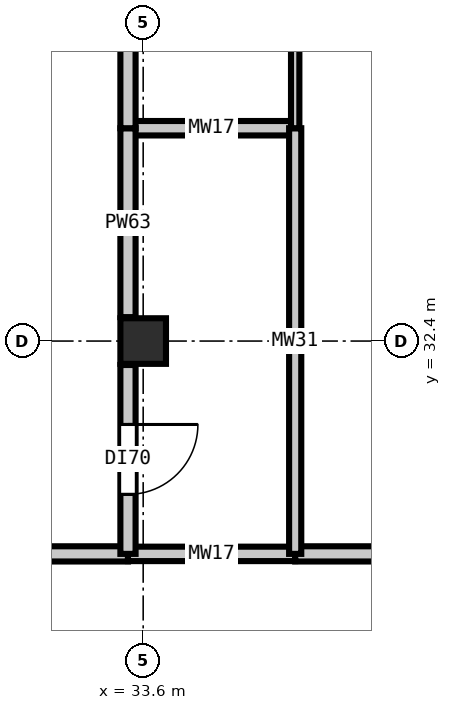
"""IFC4 building model, lengths in metres.
Left out: names, types, materials, properties, quantities, classifications, styles, units other than length and angle.
Written with IfcOpenShell. Run it as: python <this file> out.ifc"""

import sys

from ifc_helpers import new_model, si_unit, direction, frame, frame_2d, origin, origin_2d, place, context, subcontext, project, spatial, rectangle, extrude, element, fill, save


model = new_model("IFC4")
c1 = context("Model", 3, precision=1e-05, world=origin(), true_north=direction((0.0, 1.0)))
c2 = subcontext(c1, "Body", "Model", "MODEL_VIEW")
j1 = project(units=[si_unit("LENGTHUNIT", "METRE"), si_unit("PLANEANGLEUNIT", "RADIAN")], contexts=[c1])
p1 = place(None, origin())
s1 = spatial("IfcSite", under=j1, at=p1, CompositionType="ELEMENT")
p2 = place(p1, origin())
s2 = spatial("IfcBuilding", under=s1, at=p2, CompositionType="ELEMENT")
p3 = place(p2, frame((0.0, 0.0, 5.4)))
s3 = spatial("IfcBuildingStorey", under=s2, at=p3, CompositionType="ELEMENT", Elevation=5.4)
p4 = place(p3, frame((33.6, 32.4, 0.0), z_axis=(0.0, 0.0, 1.0), x_axis=(1.0, 0.0, 0.0)))
e1 = element("IfcColumn", 1, at=p4, inside=s3, PredefinedType="COLUMN", context=c2, shape_type="SweptSolid", body=[
    extrude(rectangle(XDim=0.6, YDim=0.6, at=origin_2d()), origin(), (0.0, 0.0, 1.0), 5.4),
])
p5 = place(p3, frame((28.6, 29.6, 0.0), z_axis=(0.0, 0.0, 1.0), x_axis=(1.0, 0.0, 0.0)))
e2 = element("IfcWall", 2, at=p5, inside=s3, PredefinedType="PARTITIONING", context=c2, shape_type="SweptSolid", body=[
    extrude(rectangle(XDim=4.8, YDim=0.2, at=frame_2d((2.4, 0.0))), origin(), (0.0, 0.0, 1.0), 5.05),
])
p6 = place(p5, frame((1.775, 0.0, 0.0)))
e3 = element("IfcOpeningElement", 3, at=p6, cuts=e2, PredefinedType="OPENING", context=c2, shape_type="SweptSolid", body=[
    extrude(rectangle(XDim=1.25, YDim=2.15, at=frame_2d((0.625, 1.075))), frame((0.0, 0.11, 0.0), z_axis=(0.0, -1.0, 0.0), x_axis=(1.0, 0.0, 0.0)), (0.0, 0.0, 1.0), 0.22),
])
p7 = place(p3, frame((33.4, 29.6, 0.0), z_axis=(0.0, 0.0, 1.0), x_axis=(1.0, 0.0, 0.0)))
e4 = element("IfcWall", 4, at=p7, inside=s3, PredefinedType="PLUMBINGWALL", context=c2, shape_type="SweptSolid", body=[
    extrude(rectangle(XDim=2.2, YDim=0.19, at=frame_2d((1.1, 0.0))), origin(), (0.0, 0.0, 1.0), 5.05),
])
p8 = place(p3, frame((35.6, 29.6, 0.0), z_axis=(0.0, 0.0, 1.0), x_axis=(1.0, 0.0, 0.0)))
e5 = element("IfcWall", 5, at=p8, inside=s3, PredefinedType="PARTITIONING", context=c2, shape_type="SweptSolid", body=[
    extrude(rectangle(XDim=5.6, YDim=0.2, at=frame_2d((2.8, 0.0))), origin(), (0.0, 0.0, 1.0), 5.05),
])
p9 = place(p8, frame((2.15, 0.0, 0.0)))
e6 = element("IfcOpeningElement", 6, at=p9, cuts=e5, PredefinedType="OPENING", context=c2, shape_type="SweptSolid", body=[
    extrude(rectangle(XDim=1.3, YDim=2.2, at=frame_2d((0.65, 1.1))), frame((0.0, 0.11, 0.0), z_axis=(0.0, -1.0, 0.0), x_axis=(1.0, 0.0, 0.0)), (0.0, 0.0, 1.0), 0.22),
])
p10 = place(p3, frame((33.4, 35.2, 0.0), z_axis=(0.0, 0.0, 1.0), x_axis=(1.0, 0.0, 0.0)))
e7 = element("IfcWall", 7, at=p10, inside=s3, PredefinedType="PLUMBINGWALL", context=c2, shape_type="SweptSolid", body=[
    extrude(rectangle(XDim=2.2, YDim=0.19, at=frame_2d((1.1, 0.0))), origin(), (0.0, 0.0, 1.0), 5.05),
])
p11 = place(p3, frame((33.4, 29.6, 0.0), z_axis=(0.0, 0.0, 1.0), x_axis=(0.0, 1.0, 0.0)))
e8 = element("IfcWall", 8, at=p11, inside=s3, PredefinedType="PARTITIONING", context=c2, shape_type="SweptSolid", body=[
    extrude(rectangle(XDim=2.485, YDim=0.2, at=frame_2d((1.242, 0.0))), origin(), (0.0, 0.0, 1.0), 4.735),
])
p12 = place(p11, frame((0.782, 0.0, 0.0)))
e9 = element("IfcOpeningElement", 9, at=p12, cuts=e8, PredefinedType="OPENING", context=c2, shape_type="SweptSolid", body=[
    extrude(rectangle(XDim=0.92, YDim=2.1, at=frame_2d((0.46, 1.05))), frame((0.0, 0.11, 0.0), z_axis=(0.0, -1.0, 0.0), x_axis=(1.0, 0.0, 0.0)), (0.0, 0.0, 1.0), 0.22),
])
p13 = place(p3, frame((33.4, 32.715, 0.0), z_axis=(0.0, 0.0, 1.0), x_axis=(0.0, 1.0, 0.0)))
e10 = element("IfcWall", 10, at=p13, inside=s3, PredefinedType="PARTITIONING", context=c2, shape_type="SweptSolid", body=[
    extrude(rectangle(XDim=2.485, YDim=0.2, at=frame_2d((1.242, 0.0))), origin(), (0.0, 0.0, 1.0), 4.735),
])
p14 = place(p3, frame((33.4, 35.2, 0.0), z_axis=(0.0, 0.0, 1.0), x_axis=(0.0, 1.0, 0.0)))
e11 = element("IfcWall", 11, at=p14, inside=s3, PredefinedType="PARTITIONING", context=c2, shape_type="SweptSolid", body=[
    extrude(rectangle(XDim=5.285, YDim=0.2, at=frame_2d((2.643, 0.0))), origin(), (0.0, 0.0, 1.0), 4.735),
])
p15 = place(p14, frame((2.018, 0.0, 0.0)))
e12 = element("IfcOpeningElement", 12, at=p15, cuts=e11, PredefinedType="OPENING", context=c2, shape_type="SweptSolid", body=[
    extrude(rectangle(XDim=1.25, YDim=2.15, at=frame_2d((0.625, 1.075))), frame((0.0, 0.11, 0.0), z_axis=(0.0, -1.0, 0.0), x_axis=(1.0, 0.0, 0.0)), (0.0, 0.0, 1.0), 0.22),
])
p16 = place(p3, frame((35.6, 29.6, 0.0), z_axis=(0.0, 0.0, 1.0), x_axis=(0.0, 1.0, 0.0)))
e13 = element("IfcWall", 13, at=p16, inside=s3, PredefinedType="PLUMBINGWALL", context=c2, shape_type="SweptSolid", body=[
    extrude(rectangle(XDim=5.6, YDim=0.16, at=frame_2d((2.8, 0.0))), origin(), (0.0, 0.0, 1.0), 5.05),
])
p17 = place(p3, frame((35.6, 35.2, 0.0), z_axis=(0.0, 0.0, 1.0), x_axis=(0.0, 1.0, 0.0)))
e14 = element("IfcWall", 14, at=p17, inside=s3, PredefinedType="PARTITIONING", context=c2, shape_type="SweptSolid", body=[
    extrude(rectangle(XDim=5.34, YDim=0.11, at=frame_2d((2.67, 0.0))), origin(), (0.0, 0.0, 1.0), 5.05),
])
p18 = place(p12, frame((0.92, 0.0, 0.0), z_axis=(0.0, 0.0, 1.0), x_axis=(-1.0, 0.0, 0.0)))
e15 = element("IfcDoor", 15, at=p18, inside=s3, OperationType="SINGLE_SWING_LEFT", PredefinedType="DOOR", context=c2, shape_type="SweptSolid", body=[
    extrude(rectangle(XDim=0.92, YDim=2.1, at=frame_2d((0.46, 1.05))), frame((0.0, 0.025, 0.0), z_axis=(0.0, -1.0, 0.0), x_axis=(1.0, 0.0, 0.0)), (0.0, 0.0, 1.0), 0.05),
])
fill(e9, e15)
save(model, sys.argv[1])
